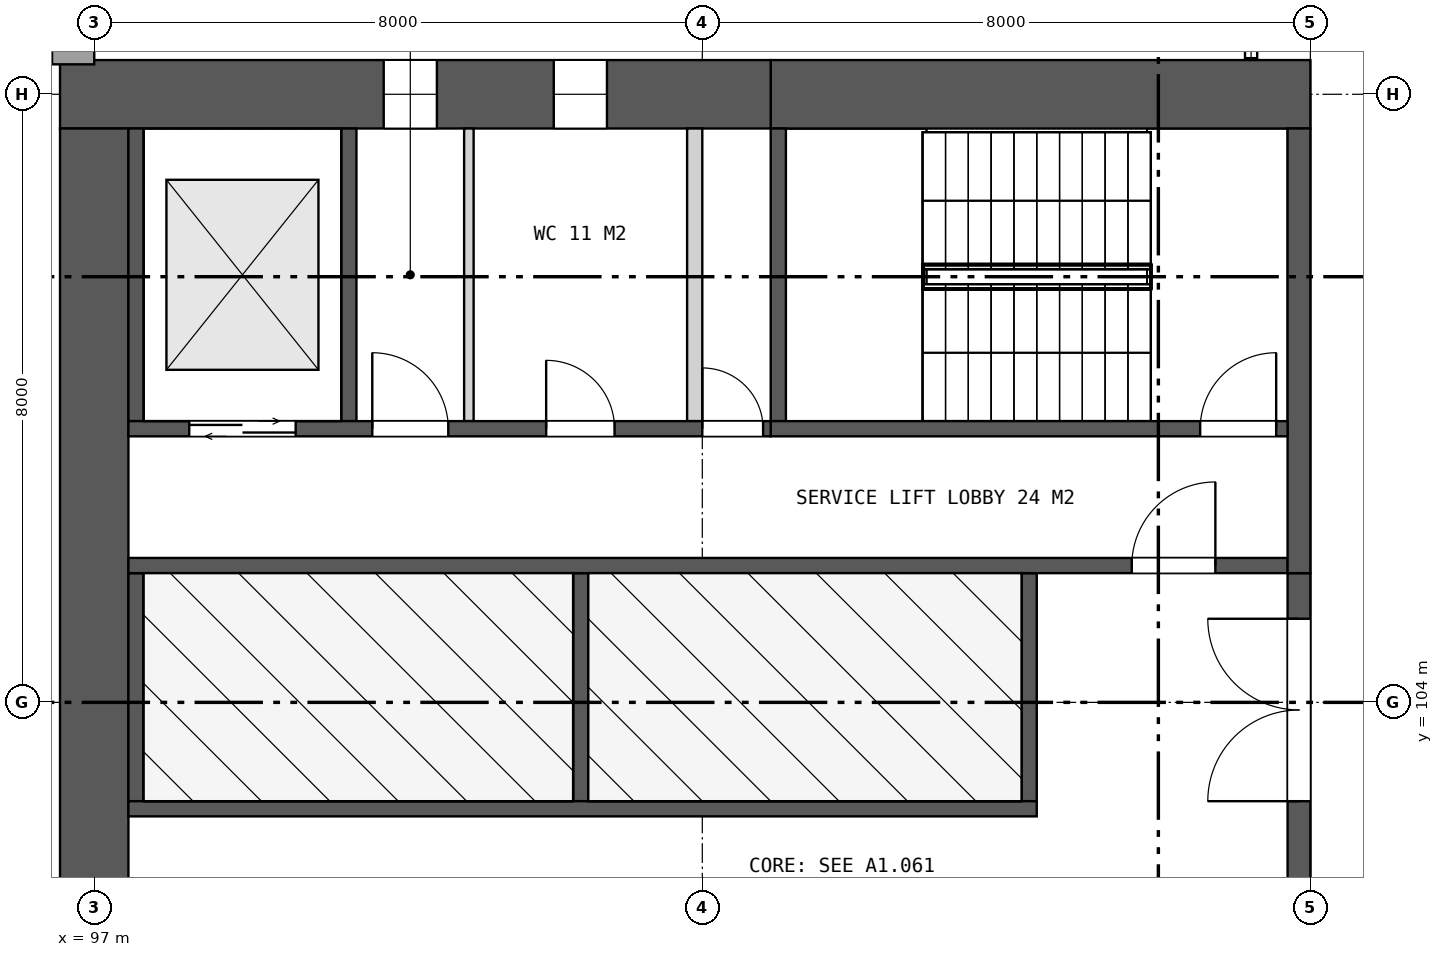
"""IFC4 building model, lengths in metres.
Left out: names, types, materials, properties, quantities, classifications, styles, units other than length and angle.
Written with IfcOpenShell. Run it as: python <this file> out.ifc"""

import sys

from ifc_helpers import new_model, si_unit, direction, frame, frame_2d, origin, place, context, subcontext, project, spatial, rectangle, extrude, element, fill, save


model = new_model("IFC4")
c1 = context("Model", 3, precision=1e-05, world=origin(), true_north=direction((0.0, 1.0)))
c2 = subcontext(c1, "Body", "Model", "MODEL_VIEW")
j1 = project(units=[si_unit("LENGTHUNIT", "METRE"), si_unit("PLANEANGLEUNIT", "RADIAN")], contexts=[c1])
p1 = place(None, origin())
s1 = spatial("IfcSite", under=j1, at=p1, CompositionType="ELEMENT")
p2 = place(p1, origin())
s2 = spatial("IfcBuilding", under=s1, at=p2, CompositionType="ELEMENT")
p3 = place(p2, frame((0.0, 0.0, 25.0)))
s3 = spatial("IfcBuildingStorey", under=s2, at=p3, CompositionType="ELEMENT", Elevation=25.0)
p4 = place(p3, frame((113.0, 112.0, 0.0), z_axis=(0.0, 0.0, 1.0), x_axis=(-1.0, 0.0, 0.0)))
e1 = element("IfcWall", 1, at=p4, inside=s3, PredefinedType="SHEAR", context=c2, shape_type="SweptSolid", body=[
    extrude(rectangle(XDim=7.1, YDim=0.9, at=frame_2d((3.55, 0.0))), origin(), (0.0, 0.0, 1.0), 9.0),
])
p5 = place(p3, frame((105.9, 112.0, 0.0), z_axis=(0.0, 0.0, 1.0), x_axis=(-1.0, 0.0, 0.0)))
e2 = element("IfcWall", 2, at=p5, inside=s3, PredefinedType="SHEAR", context=c2, shape_type="SweptSolid", body=[
    extrude(rectangle(XDim=9.35, YDim=0.9, at=frame_2d((4.675, 0.0))), origin(), (0.0, 0.0, 1.0), 9.0),
])
p6 = place(p5, frame((2.154, 0.0, 1.5)))
e3 = element("IfcOpeningElement", 3, at=p6, cuts=e2, PredefinedType="OPENING", context=c2, shape_type="SweptSolid", body=[
    extrude(rectangle(XDim=0.7, YDim=0.9, at=frame_2d((0.35, 0.45))), frame((0.0, 0.46, 0.0), z_axis=(0.0, -1.0, 0.0), x_axis=(1.0, 0.0, 0.0)), (0.0, 0.0, 1.0), 0.92),
])
p7 = place(p5, frame((4.392, 0.0, 1.5)))
e4 = element("IfcOpeningElement", 4, at=p7, cuts=e2, PredefinedType="OPENING", context=c2, shape_type="SweptSolid", body=[
    extrude(rectangle(XDim=0.7, YDim=0.9, at=frame_2d((0.35, 0.45))), frame((0.0, 0.46, 0.0), z_axis=(0.0, -1.0, 0.0), x_axis=(1.0, 0.0, 0.0)), (0.0, 0.0, 1.0), 0.92),
])
p8 = place(p3, frame((97.0, 111.55, 0.0), z_axis=(0.0, 0.0, 1.0), x_axis=(0.0, -1.0, 0.0)))
e5 = element("IfcWall", 5, at=p8, inside=s3, PredefinedType="SHEAR", context=c2, shape_type="SweptSolid", body=[
    extrude(rectangle(XDim=23.1, YDim=0.9, at=frame_2d((11.55, 0.0))), origin(), (0.0, 0.0, 1.0), 9.0),
])
p9 = place(p8, frame((10.35, 0.0, 0.0)))
e6 = element("IfcOpeningElement", 6, at=p9, cuts=e5, PredefinedType="OPENING", context=c2, shape_type="SweptSolid", body=[
    extrude(rectangle(XDim=2.4, YDim=2.4, at=frame_2d((1.2, 1.2))), frame((0.0, 0.46, 0.0), z_axis=(0.0, -1.0, 0.0), x_axis=(1.0, 0.0, 0.0)), (0.0, 0.0, 1.0), 0.92),
])
p10 = place(p3, frame((112.85, 105.7, 0.0), z_axis=(0.0, 0.0, 1.0), x_axis=(0.0, -1.0, 0.0)))
e7 = element("IfcWall", 7, at=p10, inside=s3, PredefinedType="SHEAR", context=c2, shape_type="SweptSolid", body=[
    extrude(rectangle(XDim=11.4, YDim=0.3, at=frame_2d((5.7, 0.0))), origin(), (0.0, 0.0, 1.0), 9.0),
])
p11 = place(p10, frame((0.6, 0.0, 0.0)))
e8 = element("IfcOpeningElement", 8, at=p11, cuts=e7, PredefinedType="OPENING", context=c2, shape_type="SweptSolid", body=[
    extrude(rectangle(XDim=2.4, YDim=2.4, at=frame_2d((1.2, 1.2))), frame((0.0, 0.16, 0.0), z_axis=(0.0, -1.0, 0.0), x_axis=(1.0, 0.0, 0.0)), (0.0, 0.0, 1.0), 0.32),
])
p12 = place(p10, frame((4.5, 0.0, 0.0)))
e9 = element("IfcOpeningElement", 9, at=p12, cuts=e7, PredefinedType="OPENING", context=c2, shape_type="SweptSolid", body=[
    extrude(rectangle(XDim=2.4, YDim=2.4, at=frame_2d((1.2, 1.2))), frame((0.0, 0.16, 0.0), z_axis=(0.0, -1.0, 0.0), x_axis=(1.0, 0.0, 0.0)), (0.0, 0.0, 1.0), 0.32),
])
p13 = place(p10, frame((8.4, 0.0, 0.0)))
e10 = element("IfcOpeningElement", 10, at=p13, cuts=e7, PredefinedType="OPENING", context=c2, shape_type="SweptSolid", body=[
    extrude(rectangle(XDim=2.4, YDim=2.4, at=frame_2d((1.2, 1.2))), frame((0.0, 0.16, 0.0), z_axis=(0.0, -1.0, 0.0), x_axis=(1.0, 0.0, 0.0)), (0.0, 0.0, 1.0), 0.32),
])
for number, where, z_axis, x_axis in (
    (11, (109.3, 105.7, 0.0), (0.0, 0.0, 1.0), (0.0, -1.0, 0.0)),
    (12, (103.4, 105.7, 0.0), (0.0, 0.0, 1.0), (0.0, -1.0, 0.0)),
    (13, (97.55, 105.7, 0.0), (0.0, 0.0, 1.0), (0.0, -1.0, 0.0)),
):
    element("IfcWall", number, at=place(p3, frame(where, z_axis=z_axis, x_axis=x_axis)), inside=s3, PredefinedType="SHEAR", context=c2, shape_type="SweptSolid", body=[
        extrude(rectangle(XDim=3.0, YDim=0.2, at=frame_2d((1.5, 0.0))), origin(), (0.0, 0.0, 1.0), 9.0),
    ])
p14 = place(p3, frame((109.4, 102.6, 0.0), z_axis=(0.0, 0.0, 1.0), x_axis=(-1.0, 0.0, 0.0)))
e14 = element("IfcWall", 14, at=p14, inside=s3, PredefinedType="SHEAR", context=c2, shape_type="SweptSolid", body=[
    extrude(rectangle(XDim=11.95, YDim=0.2, at=frame_2d((5.975, 0.0))), origin(), (0.0, 0.0, 1.0), 9.0),
])
p15 = place(p3, frame((112.7, 105.8, 0.0), z_axis=(0.0, 0.0, 1.0), x_axis=(-1.0, 0.0, 0.0)))
e15 = element("IfcWall", 15, at=p15, inside=s3, PredefinedType="SHEAR", context=c2, shape_type="SweptSolid", body=[
    extrude(rectangle(XDim=15.25, YDim=0.2, at=frame_2d((7.625, 0.0))), origin(), (0.0, 0.0, 1.0), 9.0),
])
p16 = place(p15, frame((0.95, 0.0, 0.0)))
e16 = element("IfcOpeningElement", 16, at=p16, cuts=e15, PredefinedType="OPENING", context=c2, shape_type="SweptSolid", body=[
    extrude(rectangle(XDim=1.1, YDim=2.1, at=frame_2d((0.55, 1.05))), frame((0.0, 0.11, 0.0), z_axis=(0.0, -1.0, 0.0), x_axis=(1.0, 0.0, 0.0)), (0.0, 0.0, 1.0), 0.22),
])
p17 = place(p3, frame((112.85, 111.55, 0.0), z_axis=(0.0, 0.0, 1.0), x_axis=(0.0, -1.0, 0.0)))
e17 = element("IfcWall", 17, at=p17, inside=s3, PredefinedType="SHEAR", context=c2, shape_type="SweptSolid", body=[
    extrude(rectangle(XDim=5.85, YDim=0.3, at=frame_2d((2.925, 0.0))), origin(), (0.0, 0.0, 1.0), 9.0),
])
for number, where, z_axis, x_axis in (
    (18, (106.0, 111.55, 0.0), (0.0, 0.0, 1.0), (0.0, -1.0, 0.0)),
    (19, (100.35, 111.55, 0.0), (0.0, 0.0, 1.0), (0.0, -1.0, 0.0)),
    (20, (97.55, 111.55, 0.0), (0.0, 0.0, 1.0), (0.0, -1.0, 0.0)),
):
    element("IfcWall", number, at=place(p3, frame(where, z_axis=z_axis, x_axis=x_axis)), inside=s3, PredefinedType="SHEAR", context=c2, shape_type="SweptSolid", body=[
        extrude(rectangle(XDim=3.85, YDim=0.2, at=frame_2d((1.925, 0.0))), origin(), (0.0, 0.0, 1.0), 9.0),
    ])
p18 = place(p3, frame((104.9, 111.55, 0.0), z_axis=(0.0, 0.0, 1.0), x_axis=(0.0, -1.0, 0.0)))
e21 = element("IfcWall", 21, at=p18, inside=s3, PredefinedType="PARTITIONING", context=c2, shape_type="SweptSolid", body=[
    extrude(rectangle(XDim=3.85, YDim=0.2, at=frame_2d((1.925, 0.0))), origin(), (0.0, 0.0, 1.0), 9.0),
])
p19 = place(p3, frame((101.929, 111.55, 0.0), z_axis=(0.0, 0.0, 1.0), x_axis=(0.0, -1.0, 0.0)))
e22 = element("IfcWall", 22, at=p19, inside=s3, PredefinedType="PARTITIONING", context=c2, shape_type="SweptSolid", body=[
    extrude(rectangle(XDim=3.85, YDim=0.125, at=frame_2d((1.925, 0.0))), origin(), (0.0, 0.0, 1.0), 9.0),
])
p20 = place(p3, frame((112.7, 107.6, 0.0), z_axis=(0.0, 0.0, 1.0), x_axis=(-1.0, 0.0, 0.0)))
e23 = element("IfcWall", 23, at=p20, inside=s3, PredefinedType="SHEAR", context=c2, shape_type="SweptSolid", body=[
    extrude(rectangle(XDim=6.8, YDim=0.2, at=frame_2d((3.4, 0.0))), origin(), (0.0, 0.0, 1.0), 9.0),
])
p21 = place(p20, frame((0.15, 0.0, 0.0)))
e24 = element("IfcOpeningElement", 24, at=p21, cuts=e23, PredefinedType="OPENING", context=c2, shape_type="SweptSolid", body=[
    extrude(rectangle(XDim=1.0, YDim=2.1, at=frame_2d((0.5, 1.05))), frame((0.0, 0.11, 0.0), z_axis=(0.0, -1.0, 0.0), x_axis=(1.0, 0.0, 0.0)), (0.0, 0.0, 1.0), 0.22),
])
p22 = place(p3, frame((105.9, 107.6, 0.0), z_axis=(0.0, 0.0, 1.0), x_axis=(-1.0, 0.0, 0.0)))
e25 = element("IfcWall", 25, at=p22, inside=s3, PredefinedType="SHEAR", context=c2, shape_type="SweptSolid", body=[
    extrude(rectangle(XDim=8.45, YDim=0.2, at=frame_2d((4.225, 0.0))), origin(), (0.0, 0.0, 1.0), 9.0),
])
p23 = place(p22, frame((0.1, 0.0, 0.0)))
e26 = element("IfcOpeningElement", 26, at=p23, cuts=e25, PredefinedType="OPENING", context=c2, shape_type="SweptSolid", body=[
    extrude(rectangle(XDim=0.8, YDim=2.1, at=frame_2d((0.4, 1.05))), frame((0.0, 0.11, 0.0), z_axis=(0.0, -1.0, 0.0), x_axis=(1.0, 0.0, 0.0)), (0.0, 0.0, 1.0), 0.22),
])
p24 = place(p22, frame((2.054, 0.0, 0.0)))
e27 = element("IfcOpeningElement", 27, at=p24, cuts=e25, PredefinedType="OPENING", context=c2, shape_type="SweptSolid", body=[
    extrude(rectangle(XDim=0.9, YDim=2.1, at=frame_2d((0.45, 1.05))), frame((0.0, 0.11, 0.0), z_axis=(0.0, -1.0, 0.0), x_axis=(1.0, 0.0, 0.0)), (0.0, 0.0, 1.0), 0.22),
])
p25 = place(p22, frame((4.242, 0.0, 0.0)))
e28 = element("IfcOpeningElement", 28, at=p25, cuts=e25, PredefinedType="OPENING", context=c2, shape_type="SweptSolid", body=[
    extrude(rectangle(XDim=1.0, YDim=2.1, at=frame_2d((0.5, 1.05))), frame((0.0, 0.11, 0.0), z_axis=(0.0, -1.0, 0.0), x_axis=(1.0, 0.0, 0.0)), (0.0, 0.0, 1.0), 0.22),
])
p26 = place(p22, frame((6.25, 0.0, 0.0)))
e29 = element("IfcOpeningElement", 29, at=p26, cuts=e25, PredefinedType="OPENING", context=c2, shape_type="SweptSolid", body=[
    extrude(rectangle(XDim=1.4, YDim=2.1, at=frame_2d((0.7, 1.05))), frame((0.0, 0.11, 0.0), z_axis=(0.0, -1.0, 0.0), x_axis=(1.0, 0.0, 0.0)), (0.0, 0.0, 1.0), 0.22),
])
p27 = place(p3, frame((96.445, 112.547, 0.0), z_axis=(0.0, 0.0, 1.0), x_axis=(1.0, 0.0, 0.0)))
e30 = element("IfcWall", 30, at=p27, inside=s3, PredefinedType="SOLIDWALL", context=c2, shape_type="SweptSolid", body=[
    extrude(rectangle(XDim=0.555, YDim=0.306, at=frame_2d((0.277, 0.0))), origin(), (0.0, 0.0, 1.0), 8.6),
])
p28 = place(p6, origin())
e31 = element("IfcWindow", 31, at=p28, inside=s3, PartitioningType="SINGLE_PANEL", PredefinedType="WINDOW", context=c2, shape_type="SweptSolid", body=[
    extrude(rectangle(XDim=0.7, YDim=0.9, at=frame_2d((0.35, 0.45))), frame((0.0, 0.03, 0.0), z_axis=(0.0, -1.0, 0.0), x_axis=(1.0, 0.0, 0.0)), (0.0, 0.0, 1.0), 0.06),
])
fill(e3, e31)
p29 = place(p7, origin())
e32 = element("IfcWindow", 32, at=p29, inside=s3, PartitioningType="SINGLE_PANEL", PredefinedType="WINDOW", context=c2, shape_type="SweptSolid", body=[
    extrude(rectangle(XDim=0.7, YDim=0.9, at=frame_2d((0.35, 0.45))), frame((0.0, 0.03, 0.0), z_axis=(0.0, -1.0, 0.0), x_axis=(1.0, 0.0, 0.0)), (0.0, 0.0, 1.0), 0.06),
])
fill(e4, e32)
p30 = place(p11, frame((2.4, 0.0, 0.0), z_axis=(0.0, 0.0, 1.0), x_axis=(-1.0, 0.0, 0.0)))
e33 = element("IfcDoor", 33, at=p30, inside=s3, OperationType="DOUBLE_DOOR_SINGLE_SWING", PredefinedType="DOOR", context=c2, shape_type="SweptSolid", body=[
    extrude(rectangle(XDim=2.4, YDim=2.4, at=frame_2d((1.2, 1.2))), frame((0.0, 0.025, 0.0), z_axis=(0.0, -1.0, 0.0), x_axis=(1.0, 0.0, 0.0)), (0.0, 0.0, 1.0), 0.05),
])
fill(e8, e33)
p31 = place(p16, frame((1.1, 0.0, 0.0), z_axis=(0.0, 0.0, 1.0), x_axis=(-1.0, 0.0, 0.0)))
e34 = element("IfcDoor", 34, at=p31, inside=s3, OperationType="SINGLE_SWING_RIGHT", PredefinedType="DOOR", context=c2, shape_type="SweptSolid", body=[
    extrude(rectangle(XDim=1.1, YDim=2.1, at=frame_2d((0.55, 1.05))), frame((0.0, 0.025, 0.0), z_axis=(0.0, -1.0, 0.0), x_axis=(1.0, 0.0, 0.0)), (0.0, 0.0, 1.0), 0.05),
])
fill(e16, e34)
p32 = place(p21, frame((1.0, 0.0, 0.0), z_axis=(0.0, 0.0, 1.0), x_axis=(-1.0, 0.0, 0.0)))
e35 = element("IfcDoor", 35, at=p32, inside=s3, OperationType="SINGLE_SWING_RIGHT", PredefinedType="DOOR", context=c2, shape_type="SweptSolid", body=[
    extrude(rectangle(XDim=1.0, YDim=2.1, at=frame_2d((0.5, 1.05))), frame((0.0, 0.025, 0.0), z_axis=(0.0, -1.0, 0.0), x_axis=(1.0, 0.0, 0.0)), (0.0, 0.0, 1.0), 0.05),
])
fill(e24, e35)
p33 = place(p23, frame((0.8, 0.0, 0.0), z_axis=(0.0, 0.0, 1.0), x_axis=(-1.0, 0.0, 0.0)))
e36 = element("IfcDoor", 36, at=p33, inside=s3, OperationType="SINGLE_SWING_LEFT", PredefinedType="DOOR", context=c2, shape_type="SweptSolid", body=[
    extrude(rectangle(XDim=0.8, YDim=2.1, at=frame_2d((0.4, 1.05))), frame((0.0, 0.025, 0.0), z_axis=(0.0, -1.0, 0.0), x_axis=(1.0, 0.0, 0.0)), (0.0, 0.0, 1.0), 0.05),
])
fill(e26, e36)
p34 = place(p24, frame((0.9, 0.0, 0.0), z_axis=(0.0, 0.0, 1.0), x_axis=(-1.0, 0.0, 0.0)))
e37 = element("IfcDoor", 37, at=p34, inside=s3, OperationType="SINGLE_SWING_LEFT", PredefinedType="DOOR", context=c2, shape_type="SweptSolid", body=[
    extrude(rectangle(XDim=0.9, YDim=2.1, at=frame_2d((0.45, 1.05))), frame((0.0, 0.025, 0.0), z_axis=(0.0, -1.0, 0.0), x_axis=(1.0, 0.0, 0.0)), (0.0, 0.0, 1.0), 0.05),
])
fill(e27, e37)
p35 = place(p25, frame((1.0, 0.0, 0.0), z_axis=(0.0, 0.0, 1.0), x_axis=(-1.0, 0.0, 0.0)))
e38 = element("IfcDoor", 38, at=p35, inside=s3, OperationType="SINGLE_SWING_LEFT", PredefinedType="DOOR", context=c2, shape_type="SweptSolid", body=[
    extrude(rectangle(XDim=1.0, YDim=2.1, at=frame_2d((0.5, 1.05))), frame((0.0, 0.025, 0.0), z_axis=(0.0, -1.0, 0.0), x_axis=(1.0, 0.0, 0.0)), (0.0, 0.0, 1.0), 0.05),
])
fill(e28, e38)
p36 = place(p26, origin())
e39 = element("IfcDoor", 39, at=p36, inside=s3, OperationType="DOUBLE_DOOR_SLIDING", PredefinedType="DOOR", context=c2, shape_type="SweptSolid", body=[
    extrude(rectangle(XDim=1.4, YDim=2.1, at=frame_2d((0.7, 1.05))), frame((0.0, 0.025, 0.0), z_axis=(0.0, -1.0, 0.0), x_axis=(1.0, 0.0, 0.0)), (0.0, 0.0, 1.0), 0.05),
])
fill(e29, e39)
save(model, sys.argv[1])
